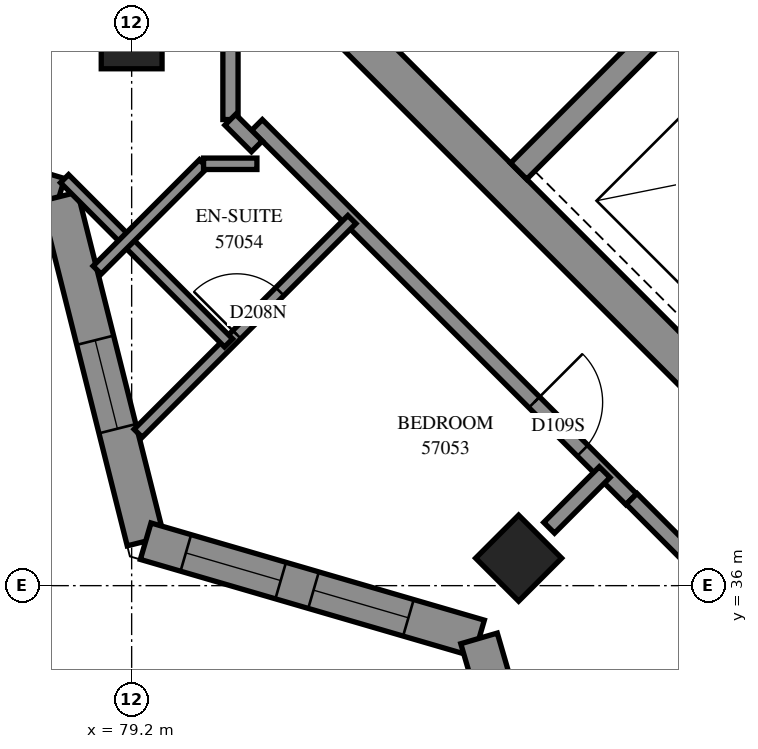
"""IFC4 building model, lengths in metres.
Left out: names, types, materials, properties, quantities, classifications, styles, units other than length and angle.
Written with IfcOpenShell. Run it as: python <this file> out.ifc"""

import sys

from ifc_helpers import new_model, si_unit, direction, frame, frame_2d, origin, origin_2d, place, context, subcontext, project, spatial, polyline, rectangle, outline, extrude, element, fill, save


model = new_model("IFC4")
c1 = context("Model", 3, precision=1e-05, world=origin(), true_north=direction((0.0, 1.0)))
c2 = subcontext(c1, "Body", "Model", "MODEL_VIEW")
j1 = project(units=[si_unit("LENGTHUNIT", "METRE"), si_unit("PLANEANGLEUNIT", "RADIAN")], contexts=[c1])
p1 = place(None, origin())
s1 = spatial("IfcSite", under=j1, at=p1, CompositionType="ELEMENT")
p2 = place(p1, origin())
s2 = spatial("IfcBuilding", under=s1, at=p2, CompositionType="ELEMENT")
p3 = place(p2, frame((0.0, 0.0, 210.0)))
s3 = spatial("IfcBuildingStorey", under=s2, at=p3, CompositionType="ELEMENT", Elevation=210.0)
for number, where, z_axis, x_axis in (
    (1, (79.2, 43.2, 0.0), (0.0, 0.0, 1.0), (1.0, 0.0, 0.0)),
    (2, (84.291, 36.362, 0.0), (0.0, 0.0, 1.0), (0.707, -0.707, 0.0)),
):
    element("IfcColumn", number, at=place(p3, frame(where, z_axis=z_axis, x_axis=x_axis)), inside=s3, PredefinedType="COLUMN", context=c2, shape_type="SweptSolid", body=[
        extrude(rectangle(XDim=0.8, YDim=0.8, at=origin_2d()), origin(), (0.0, 0.0, 1.0), 3.1),
    ])
p4 = place(p3, frame((76.124, 49.267, -0.3), z_axis=(0.0, 0.0, 1.0), x_axis=(0.7071067812, -0.7071067812, 0.0)))
e3 = element("IfcWall", 3, at=p4, inside=s3, PredefinedType="SHEAR", context=c2, shape_type="SweptSolid", body=[
    extrude(rectangle(XDim=15.4, YDim=0.5, at=frame_2d((7.7, 0.0))), origin(), (0.0, 0.0, 1.0), 2.7),
])
p5 = place(p3, frame((84.291, 41.453, 0.0), z_axis=(0.0, 0.0, 1.0), x_axis=(0.7071067812, 0.7071067812, 0.0)))
e4 = element("IfcWall", 4, at=p5, inside=s3, PredefinedType="SOLIDWALL", context=c2, shape_type="SweptSolid", body=[
    extrude(rectangle(XDim=3.3, YDim=0.3, at=frame_2d((1.65, 0.0))), origin(), (0.0, 0.0, 1.0), 3.1),
])
p6 = place(p3, frame((78.988, 51.423, 0.0), z_axis=(0.0, 0.0, 1.0), x_axis=(0.7071067812, -0.7071067812, 0.0)))
e5 = element("IfcWall", 5, at=p6, inside=s3, PredefinedType="SOLIDWALL", context=c2, shape_type="SweptSolid", body=[
    extrude(rectangle(XDim=14.4, YDim=0.3, at=frame_2d((7.2, 0.0))), origin(), (0.0, 0.0, 1.0), 3.1),
])
p7 = place(p6, frame((1.35, 0.0, 0.0)))
e6 = element("IfcOpeningElement", 6, at=p7, cuts=e5, PredefinedType="OPENING", context=c2, shape_type="SweptSolid", body=[
    extrude(rectangle(XDim=0.9, YDim=2.1, at=frame_2d((0.45, 1.05))), frame((0.0, 0.16, 0.0), z_axis=(0.0, -1.0, 0.0), x_axis=(1.0, 0.0, 0.0)), (0.0, 0.0, 1.0), 0.32),
])
p8 = place(p6, frame((4.95, 0.0, 0.0)))
e7 = element("IfcOpeningElement", 7, at=p8, cuts=e5, PredefinedType="OPENING", context=c2, shape_type="SweptSolid", body=[
    extrude(rectangle(XDim=0.9, YDim=2.1, at=frame_2d((0.45, 1.05))), frame((0.0, 0.16, 0.0), z_axis=(0.0, -1.0, 0.0), x_axis=(1.0, 0.0, 0.0)), (0.0, 0.0, 1.0), 0.32),
])
p9 = place(p6, frame((8.55, 0.0, 0.0)))
e8 = element("IfcOpeningElement", 8, at=p9, cuts=e5, PredefinedType="OPENING", context=c2, shape_type="SweptSolid", body=[
    extrude(rectangle(XDim=0.9, YDim=2.1, at=frame_2d((0.45, 1.05))), frame((0.0, 0.16, 0.0), z_axis=(0.0, -1.0, 0.0), x_axis=(1.0, 0.0, 0.0)), (0.0, 0.0, 1.0), 0.32),
])
p10 = place(p6, frame((12.05, 0.0, 0.0)))
e9 = element("IfcOpeningElement", 9, at=p10, cuts=e5, PredefinedType="OPENING", context=c2, shape_type="SweptSolid", body=[
    extrude(rectangle(XDim=1.1, YDim=2.1, at=frame_2d((0.55, 1.05))), frame((0.0, 0.16, 0.0), z_axis=(0.0, -1.0, 0.0), x_axis=(1.0, 0.0, 0.0)), (0.0, 0.0, 1.0), 0.32),
])
p11 = place(p3, frame((74.453, 42.255, 0.0), z_axis=(0.0, 0.0, 1.0), x_axis=(0.9577859598, -0.2874822693, 0.0)))
e10 = element("IfcWall", 10, at=p11, inside=s3, PredefinedType="SOLIDWALL", context=c2, shape_type="SweptSolid", body=[
    extrude(outline(polyline([(0.054, -0.25), (3.817, -0.25), (4.101, 0.25), (-0.054, 0.25), (0.054, -0.25)])), origin(), (0.0, 0.0, 1.0), 3.1),
])
p12 = place(p11, frame((1.828, 0.0, 0.45)))
e11 = element("IfcOpeningElement", 11, at=p12, cuts=e10, PredefinedType="OPENING", context=c2, shape_type="SweptSolid", body=[
    extrude(rectangle(XDim=1.2, YDim=2.5, at=frame_2d((0.6, 1.25))), frame((0.0, 0.26, 0.0), z_axis=(0.0, -1.0, 0.0), x_axis=(1.0, 0.0, 0.0)), (0.0, 0.0, 1.0), 0.52),
])
p13 = place(p3, frame((78.246, 41.117, 0.0), z_axis=(0.0, 0.0, 1.0), x_axis=(0.2436885681, -0.9698535363, 0.0)))
e12 = element("IfcWall", 12, at=p13, inside=s3, PredefinedType="SOLIDWALL", context=c2, shape_type="SweptSolid", body=[
    extrude(outline(polyline([(0.142, -0.25), (4.816, -0.25), (4.529, 0.25), (-0.142, 0.25), (0.142, -0.25)])), origin(), (0.0, 0.0, 1.0), 3.1),
])
p14 = place(p13, frame((1.947, 0.0, 0.45)))
e13 = element("IfcOpeningElement", 13, at=p14, cuts=e12, PredefinedType="OPENING", context=c2, shape_type="SweptSolid", body=[
    extrude(rectangle(XDim=1.2, YDim=2.5, at=frame_2d((0.6, 1.25))), frame((0.0, 0.26, 0.0), z_axis=(0.0, -1.0, 0.0), x_axis=(1.0, 0.0, 0.0)), (0.0, 0.0, 1.0), 0.52),
])
p15 = place(p3, frame((79.385, 36.585, 0.0), z_axis=(0.0, 0.0, 1.0), x_axis=(0.960028924, -0.2799008129, 0.0)))
e14 = element("IfcWall", 14, at=p15, inside=s3, PredefinedType="SOLIDWALL", context=c2, shape_type="SweptSolid", body=[
    extrude(outline(polyline([(-0.143, -0.25), (4.431, -0.25), (4.706, 0.25), (0.143, 0.25), (-0.143, -0.25)])), origin(), (0.0, 0.0, 1.0), 3.1),
])
p16 = place(p15, frame((0.55, 0.0, 0.45)))
e15 = element("IfcOpeningElement", 15, at=p16, cuts=e14, PredefinedType="OPENING", context=c2, shape_type="SweptSolid", body=[
    extrude(rectangle(XDim=1.3, YDim=2.5, at=frame_2d((0.65, 1.25))), frame((0.0, 0.26, 0.0), z_axis=(0.0, -1.0, 0.0), x_axis=(1.0, 0.0, 0.0)), (0.0, 0.0, 1.0), 0.52),
])
p17 = place(p15, frame((2.3, 0.0, 0.45)))
e16 = element("IfcOpeningElement", 16, at=p17, cuts=e14, PredefinedType="OPENING", context=c2, shape_type="SweptSolid", body=[
    extrude(rectangle(XDim=1.3, YDim=2.5, at=frame_2d((0.65, 1.25))), frame((0.0, 0.26, 0.0), z_axis=(0.0, -1.0, 0.0), x_axis=(1.0, 0.0, 0.0)), (0.0, 0.0, 1.0), 0.52),
])
p18 = place(p3, frame((83.77, 35.306, 0.0), z_axis=(0.0, 0.0, 1.0), x_axis=(0.2799008129, -0.960028924, 0.0)))
e17 = element("IfcWall", 17, at=p18, inside=s3, PredefinedType="SOLIDWALL", context=c2, shape_type="SweptSolid", body=[
    extrude(outline(polyline([(0.137, -0.25), (4.712, -0.25), (4.425, 0.25), (-0.137, 0.25), (0.137, -0.25)])), origin(), (0.0, 0.0, 1.0), 3.1),
])
p19 = place(p18, frame((1.014, 0.0, 0.45)))
e18 = element("IfcOpeningElement", 18, at=p19, cuts=e17, PredefinedType="OPENING", context=c2, shape_type="SweptSolid", body=[
    extrude(rectangle(XDim=1.2, YDim=2.5, at=frame_2d((0.6, 1.25))), frame((0.0, 0.26, 0.0), z_axis=(0.0, -1.0, 0.0), x_axis=(1.0, 0.0, 0.0)), (0.0, 0.0, 1.0), 0.52),
])
p20 = place(p3, frame((85.002, 31.976, 0.0), z_axis=(0.0, 0.0, 1.0), x_axis=(0.7072267874, 0.7069867546, 0.0)))
e19 = element("IfcWall", 19, at=p20, inside=s3, PredefinedType="PARTITIONING", context=c2, shape_type="SweptSolid", body=[
    extrude(rectangle(XDim=9.999, YDim=0.2, at=frame_2d((4.999, 0.0))), origin(), (0.0, 0.0, 1.0), 3.1),
])
p21 = place(p3, frame((80.849, 42.061, 0.0), z_axis=(0.0, 0.0, 1.0), x_axis=(0.7071067812, -0.7071067812, 0.0)))
e20 = element("IfcWall", 20, at=p21, inside=s3, PredefinedType="PARTITIONING", context=c2, shape_type="SweptSolid", body=[
    extrude(rectangle(XDim=6.964, YDim=0.2, at=frame_2d((3.482, 0.0))), origin(), (0.0, 0.0, 1.0), 3.1),
])
p22 = place(p21, frame((5.159, 0.0, 0.0)))
e21 = element("IfcOpeningElement", 21, at=p22, cuts=e20, PredefinedType="OPENING", context=c2, shape_type="SweptSolid", body=[
    extrude(rectangle(XDim=0.9, YDim=2.1, at=frame_2d((0.45, 1.05))), frame((0.0, 0.11, 0.0), z_axis=(0.0, -1.0, 0.0), x_axis=(1.0, 0.0, 0.0)), (0.0, 0.0, 1.0), 0.22),
])
p23 = place(p3, frame((79.285, 38.005, 0.0), z_axis=(0.0, 0.0, 1.0), x_axis=(0.7070942078, 0.7071193543, 0.0)))
e22 = element("IfcWall", 22, at=p23, inside=s3, PredefinedType="PARTITIONING", context=c2, shape_type="SweptSolid", body=[
    extrude(rectangle(XDim=3.977, YDim=0.15, at=frame_2d((1.988, 0.0))), origin(), (0.0, 0.0, 1.0), 3.1),
])
p24 = place(p23, frame((1.836, 0.0, 0.0)))
e23 = element("IfcOpeningElement", 23, at=p24, cuts=e22, PredefinedType="OPENING", context=c2, shape_type="SweptSolid", body=[
    extrude(rectangle(XDim=0.8, YDim=2.1, at=frame_2d((0.4, 1.05))), frame((0.0, 0.085, 0.0), z_axis=(0.0, -1.0, 0.0), x_axis=(1.0, 0.0, 0.0)), (0.0, 0.0, 1.0), 0.17),
])
p25 = place(p3, frame((78.317, 41.354, 0.0), z_axis=(0.0, 0.0, 1.0), x_axis=(0.7065991024, -0.7076140958, 0.0)))
e24 = element("IfcWall", 24, at=p25, inside=s3, PredefinedType="PARTITIONING", context=c2, shape_type="SweptSolid", body=[
    extrude(rectangle(XDim=3.054, YDim=0.15, at=frame_2d((1.527, 0.0))), origin(), (0.0, 0.0, 1.0), 3.1),
])
p26 = place(p3, frame((80.5, 42.132, 0.0), z_axis=(0.0, 0.0, 1.0), x_axis=(0.0, 1.0, 0.0)))
e25 = element("IfcWall", 25, at=p26, inside=s3, PredefinedType="PARTITIONING", context=c2, shape_type="SweptSolid", body=[
    extrude(rectangle(XDim=2.292, YDim=0.2, at=frame_2d((1.146, 0.0))), origin(), (0.0, 0.0, 1.0), 3.1),
])
p27 = place(p3, frame((78.746, 40.152, 0.0), z_axis=(0.0, 0.0, 1.0), x_axis=(0.7070815098, 0.7071320517, 0.0)))
e26 = element("IfcWall", 26, at=p27, inside=s3, PredefinedType="PARTITIONING", context=c2, shape_type="SweptSolid", body=[
    extrude(rectangle(XDim=1.979, YDim=0.15, at=frame_2d((0.989, 0.0))), origin(), (0.0, 0.0, 1.0), 3.1),
])
p28 = place(p3, frame((85.778, 37.142, 0.0), z_axis=(0.0, 0.0, 1.0), x_axis=(0.7064400143, -0.70777292, 0.0)))
e27 = element("IfcWall", 27, at=p28, inside=s3, PredefinedType="PARTITIONING", context=c2, shape_type="SweptSolid", body=[
    extrude(rectangle(XDim=1.5, YDim=0.2, at=frame_2d((0.75, 0.0))), origin(), (0.0, 0.0, 1.0), 3.1),
])
p29 = place(p3, frame((84.693, 36.761, 0.0), z_axis=(0.0, 0.0, 1.0), x_axis=(0.7061388061, 0.708073433, 0.0)))
e28 = element("IfcWall", 28, at=p29, inside=s3, PredefinedType="PARTITIONING", context=c2, shape_type="SweptSolid", body=[
    extrude(rectangle(XDim=1.034, YDim=0.2, at=frame_2d((0.517, 0.0))), origin(), (0.0, 0.0, 1.0), 3.1),
])
p30 = place(p3, frame((80.146, 41.55, 0.0), z_axis=(0.0, 0.0, 1.0), x_axis=(1.0, 0.0, 0.0)))
e29 = element("IfcWall", 29, at=p30, inside=s3, PredefinedType="PARTITIONING", context=c2, shape_type="SweptSolid", body=[
    extrude(rectangle(XDim=0.702, YDim=0.15, at=frame_2d((0.351, 0.0))), origin(), (0.0, 0.0, 1.0), 3.1),
])
p31 = place(p3, frame((80.497, 42.129, 0.0), z_axis=(0.0, 0.0, 1.0), x_axis=(0.7071067812, -0.7071067812, 0.0)))
e30 = element("IfcWall", 30, at=p31, inside=s3, PredefinedType="PARTITIONING", context=c2, shape_type="SweptSolid", body=[
    extrude(rectangle(XDim=0.495, YDim=0.2, at=frame_2d((0.247, 0.0))), origin(), (0.0, 0.0, 1.0), 3.1),
])
p32 = place(p14, origin())
e31 = element("IfcWindow", 31, at=p32, inside=s3, PartitioningType="SINGLE_PANEL", PredefinedType="WINDOW", context=c2, shape_type="SweptSolid", body=[
    extrude(rectangle(XDim=1.2, YDim=2.5, at=frame_2d((0.6, 1.25))), frame((0.0, 0.18, 0.0), z_axis=(0.0, -1.0, 0.0), x_axis=(1.0, 0.0, 0.0)), (0.0, 0.0, 1.0), 0.06),
])
fill(e13, e31)
p33 = place(p16, origin())
e32 = element("IfcWindow", 32, at=p33, inside=s3, PartitioningType="SINGLE_PANEL", PredefinedType="WINDOW", context=c2, shape_type="SweptSolid", body=[
    extrude(rectangle(XDim=1.3, YDim=2.5, at=frame_2d((0.65, 1.25))), frame((0.0, 0.18, 0.0), z_axis=(0.0, -1.0, 0.0), x_axis=(1.0, 0.0, 0.0)), (0.0, 0.0, 1.0), 0.06),
])
fill(e15, e32)
p34 = place(p17, origin())
e33 = element("IfcWindow", 33, at=p34, inside=s3, PartitioningType="SINGLE_PANEL", PredefinedType="WINDOW", context=c2, shape_type="SweptSolid", body=[
    extrude(rectangle(XDim=1.3, YDim=2.5, at=frame_2d((0.65, 1.25))), frame((0.0, 0.18, 0.0), z_axis=(0.0, -1.0, 0.0), x_axis=(1.0, 0.0, 0.0)), (0.0, 0.0, 1.0), 0.06),
])
fill(e16, e33)
p35 = place(p22, origin())
e34 = element("IfcDoor", 34, at=p35, inside=s3, OperationType="SINGLE_SWING_RIGHT", PredefinedType="DOOR", context=c2, shape_type="SweptSolid", body=[
    extrude(rectangle(XDim=0.9, YDim=2.1, at=frame_2d((0.45, 1.05))), frame((0.0, 0.025, 0.0), z_axis=(0.0, -1.0, 0.0), x_axis=(1.0, 0.0, 0.0)), (0.0, 0.0, 1.0), 0.05),
])
fill(e21, e34)
p36 = place(p24, origin())
e35 = element("IfcDoor", 35, at=p36, inside=s3, OperationType="SINGLE_SWING_RIGHT", PredefinedType="DOOR", context=c2, shape_type="SweptSolid", body=[
    extrude(rectangle(XDim=0.8, YDim=2.1, at=frame_2d((0.4, 1.05))), frame((0.0, 0.025, 0.0), z_axis=(0.0, -1.0, 0.0), x_axis=(1.0, 0.0, 0.0)), (0.0, 0.0, 1.0), 0.05),
])
fill(e23, e35)
save(model, sys.argv[1])
